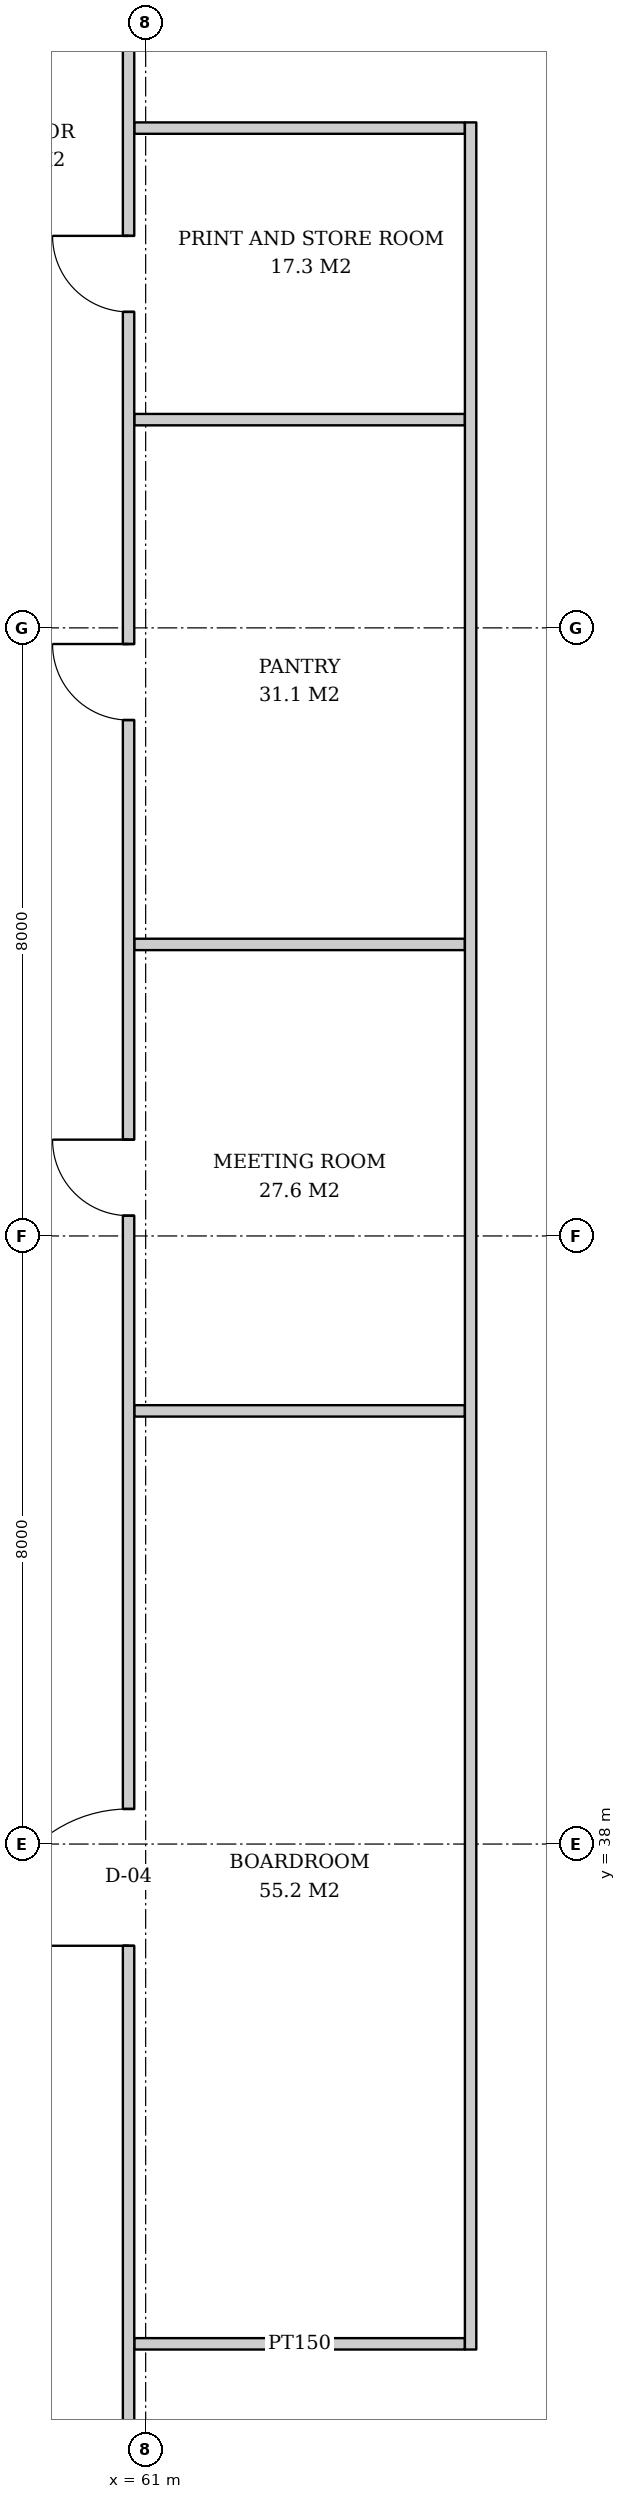
"""IFC4 building model, lengths in metres.
Left out: names, types, materials, properties, quantities, classifications, styles, units other than length and angle.
Written with IfcOpenShell. Run it as: python <this file> out.ifc"""

import sys

from ifc_helpers import new_model, si_unit, direction, frame, frame_2d, origin, place, context, subcontext, project, spatial, rectangle, extrude, element, fill, save


model = new_model("IFC4")
c1 = context("Model", 3, precision=1e-05, world=origin(), true_north=direction((0.0, 1.0)))
c2 = subcontext(c1, "Body", "Model", "MODEL_VIEW")
j1 = project(units=[si_unit("LENGTHUNIT", "METRE"), si_unit("PLANEANGLEUNIT", "RADIAN")], contexts=[c1])
p1 = place(None, origin())
s1 = spatial("IfcSite", under=j1, at=p1, CompositionType="ELEMENT")
p2 = place(p1, origin())
s2 = spatial("IfcBuilding", under=s1, at=p2, CompositionType="ELEMENT")
p3 = place(p2, frame((0.0, 0.0, 43.8)))
s3 = spatial("IfcBuildingStorey", under=s2, at=p3, CompositionType="ELEMENT", Elevation=43.8)
for number, where, z_axis, x_axis in (
    (1, (60.85, 31.425, 0.0), (0.0, 0.0, 1.0), (1.0, 0.0, 0.0)),
    (2, (60.85, 43.699, 0.0), (0.0, 0.0, 1.0), (1.0, 0.0, 0.0)),
    (3, (60.85, 49.835, 0.0), (0.0, 0.0, 1.0), (1.0, 0.0, 0.0)),
    (4, (60.85, 56.74, 0.0), (0.0, 0.0, 1.0), (1.0, 0.0, 0.0)),
    (5, (60.85, 60.575, 0.0), (0.0, 0.0, 1.0), (1.0, 0.0, 0.0)),
):
    element("IfcWall", number, at=place(p3, frame(where, z_axis=z_axis, x_axis=x_axis)), inside=s3, PredefinedType="PARTITIONING", context=c2, shape_type="SweptSolid", body=[
        extrude(rectangle(XDim=4.35, YDim=0.15, at=frame_2d((2.175, 0.0))), origin(), (0.0, 0.0, 1.0), 3.62),
    ])
p4 = place(p3, frame((65.275, 31.35, 0.0), z_axis=(0.0, 0.0, 1.0), x_axis=(0.0, 1.0, 0.0)))
e6 = element("IfcWall", 6, at=p4, inside=s3, PredefinedType="PARTITIONING", context=c2, shape_type="SweptSolid", body=[
    extrude(rectangle(XDim=29.3, YDim=0.15, at=frame_2d((14.65, 0.0))), origin(), (0.0, 0.0, 1.0), 2.612),
])
p5 = place(p3, frame((60.775, 30.15, 0.0), z_axis=(0.0, 0.0, 1.0), x_axis=(0.0, 1.0, 0.0)))
e7 = element("IfcWall", 7, at=p5, inside=s3, PredefinedType="PARTITIONING", context=c2, shape_type="SweptSolid", body=[
    extrude(rectangle(XDim=31.55, YDim=0.15, at=frame_2d((15.775, 0.0))), origin(), (0.0, 0.0, 1.0), 2.612),
])
p6 = place(p5, frame((6.512, 0.0, 0.0)))
e8 = element("IfcOpeningElement", 8, at=p6, cuts=e7, PredefinedType="OPENING", context=c2, shape_type="SweptSolid", body=[
    extrude(rectangle(XDim=1.8, YDim=2.4, at=frame_2d((0.9, 1.2))), frame((0.0, 0.085, 0.0), z_axis=(0.0, -1.0, 0.0), x_axis=(1.0, 0.0, 0.0)), (0.0, 0.0, 1.0), 0.17),
])
p7 = place(p5, frame((16.117, 0.0, 0.0)))
e9 = element("IfcOpeningElement", 9, at=p7, cuts=e7, PredefinedType="OPENING", context=c2, shape_type="SweptSolid", body=[
    extrude(rectangle(XDim=1.0, YDim=2.1, at=frame_2d((0.5, 1.05))), frame((0.0, 0.085, 0.0), z_axis=(0.0, -1.0, 0.0), x_axis=(1.0, 0.0, 0.0)), (0.0, 0.0, 1.0), 0.17),
])
p8 = place(p5, frame((22.637, 0.0, 0.0)))
e10 = element("IfcOpeningElement", 10, at=p8, cuts=e7, PredefinedType="OPENING", context=c2, shape_type="SweptSolid", body=[
    extrude(rectangle(XDim=1.0, YDim=2.1, at=frame_2d((0.5, 1.05))), frame((0.0, 0.085, 0.0), z_axis=(0.0, -1.0, 0.0), x_axis=(1.0, 0.0, 0.0)), (0.0, 0.0, 1.0), 0.17),
])
p9 = place(p5, frame((28.007, 0.0, 0.0)))
e11 = element("IfcOpeningElement", 11, at=p9, cuts=e7, PredefinedType="OPENING", context=c2, shape_type="SweptSolid", body=[
    extrude(rectangle(XDim=1.0, YDim=2.1, at=frame_2d((0.5, 1.05))), frame((0.0, 0.085, 0.0), z_axis=(0.0, -1.0, 0.0), x_axis=(1.0, 0.0, 0.0)), (0.0, 0.0, 1.0), 0.17),
])
p10 = place(p6, origin())
e12 = element("IfcDoor", 12, at=p10, inside=s3, OperationType="DOUBLE_DOOR_SINGLE_SWING", PredefinedType="DOOR", context=c2, shape_type="SweptSolid", body=[
    extrude(rectangle(XDim=1.8, YDim=2.4, at=frame_2d((0.9, 1.2))), frame((0.0, 0.025, 0.0), z_axis=(0.0, -1.0, 0.0), x_axis=(1.0, 0.0, 0.0)), (0.0, 0.0, 1.0), 0.05),
])
fill(e8, e12)
p11 = place(p7, origin())
e13 = element("IfcDoor", 13, at=p11, inside=s3, OperationType="SINGLE_SWING_RIGHT", PredefinedType="DOOR", context=c2, shape_type="SweptSolid", body=[
    extrude(rectangle(XDim=1.0, YDim=2.1, at=frame_2d((0.5, 1.05))), frame((0.0, 0.025, 0.0), z_axis=(0.0, -1.0, 0.0), x_axis=(1.0, 0.0, 0.0)), (0.0, 0.0, 1.0), 0.05),
])
fill(e9, e13)
p12 = place(p8, origin())
e14 = element("IfcDoor", 14, at=p12, inside=s3, OperationType="SINGLE_SWING_RIGHT", PredefinedType="DOOR", context=c2, shape_type="SweptSolid", body=[
    extrude(rectangle(XDim=1.0, YDim=2.1, at=frame_2d((0.5, 1.05))), frame((0.0, 0.025, 0.0), z_axis=(0.0, -1.0, 0.0), x_axis=(1.0, 0.0, 0.0)), (0.0, 0.0, 1.0), 0.05),
])
fill(e10, e14)
p13 = place(p9, origin())
e15 = element("IfcDoor", 15, at=p13, inside=s3, OperationType="SINGLE_SWING_RIGHT", PredefinedType="DOOR", context=c2, shape_type="SweptSolid", body=[
    extrude(rectangle(XDim=1.0, YDim=2.1, at=frame_2d((0.5, 1.05))), frame((0.0, 0.025, 0.0), z_axis=(0.0, -1.0, 0.0), x_axis=(1.0, 0.0, 0.0)), (0.0, 0.0, 1.0), 0.05),
])
fill(e11, e15)
save(model, sys.argv[1])
